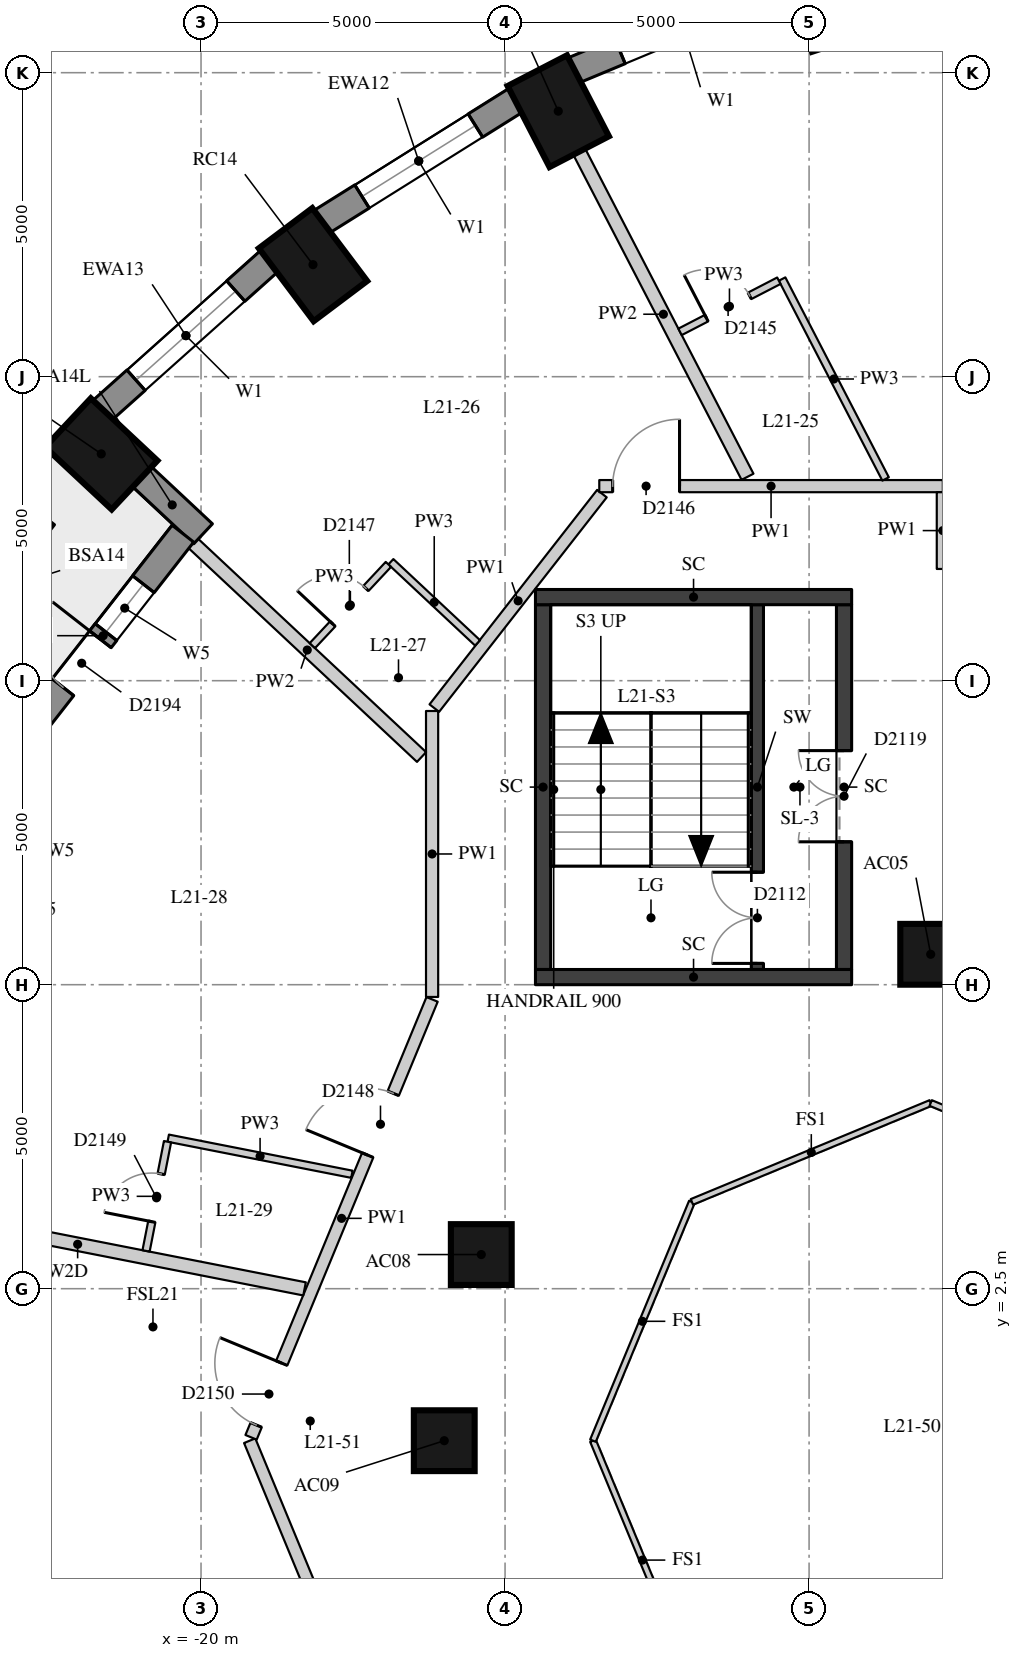
"""IFC4 building model, lengths in metres.
Left out: names, types, materials, properties, quantities, classifications, styles, units other than length and angle.
Written with IfcOpenShell. Run it as: python <this file> out.ifc"""

import sys

from ifc_helpers import new_model, si_unit, direction, frame, frame_2d, origin, origin_2d, place, context, subcontext, project, spatial, rectangle, extrude, element, fill, save


model = new_model("IFC4")
c1 = context("Model", 3, precision=1e-05, world=origin(), true_north=direction((0.0, 1.0)))
c2 = subcontext(c1, "Body", "Model", "MODEL_VIEW")
j1 = project(units=[si_unit("LENGTHUNIT", "METRE"), si_unit("PLANEANGLEUNIT", "RADIAN")], contexts=[c1])
p1 = place(None, origin())
s1 = spatial("IfcSite", under=j1, at=p1, CompositionType="ELEMENT")
p2 = place(p1, origin())
s2 = spatial("IfcBuilding", under=s1, at=p2, CompositionType="ELEMENT")
p3 = place(p2, frame((0.0, 0.0, 77.8)))
s3 = spatial("IfcBuildingStorey", under=s2, at=p3, CompositionType="ELEMENT", Elevation=77.8)
for number, where, z_axis, x_axis in (
    (1, (-14.125, 21.867, 0.0), (0.0, 0.0, 1.0), (-0.46, 0.888, 0.0)),
    (2, (-18.159, 19.343, 0.0), (0.0, 0.0, 1.0), (-0.601, 0.799, 0.0)),
    (3, (-21.641, 16.23, 0.0), (0.0, 0.0, 1.0), (-0.73, 0.683, 0.0)),
):
    element("IfcColumn", number, at=place(p3, frame(where, z_axis=z_axis, x_axis=x_axis)), inside=s3, PredefinedType="COLUMN", context=c2, shape_type="SweptSolid", body=[
        extrude(rectangle(XDim=1.5, YDim=1.1, at=origin_2d()), origin(), (0.0, 0.0, 1.0), 3.3),
    ])
for number, where, z_axis, x_axis in (
    (4, (-8.0, 8.0, 0.0), (0.0, 0.0, 1.0), (1.0, 0.0, 0.0)),
    (5, (-15.391, 3.062, 0.0), (0.0, 0.0, 1.0), (1.0, 0.0, 0.0)),
    (6, (-16.0, 0.0, 0.0), (0.0, 0.0, 1.0), (1.0, 0.0, 0.0)),
):
    element("IfcColumn", number, at=place(p3, frame(where, z_axis=z_axis, x_axis=x_axis)), inside=s3, PredefinedType="COLUMN", context=c2, shape_type="SweptSolid", body=[
        extrude(rectangle(XDim=1.0, YDim=1.0, at=origin_2d()), origin(), (0.0, 0.0, 1.0), 3.3),
    ])
p4 = place(p3, frame((-10.315, 24.021, 0.0), z_axis=(0.0, 0.0, 1.0), x_axis=(-0.923031964282, -0.384723267966, 0.0)))
e7 = element("IfcWall", 7, at=p4, inside=s3, PredefinedType="SOLIDWALL", context=c2, shape_type="SweptSolid", body=[
    extrude(rectangle(XDim=3.856, YDim=0.45, at=frame_2d((1.928, 0.0))), origin(), (0.0, 0.0, 1.0), 3.02),
])
p5 = place(p4, frame((0.828, 0.0, 0.4)))
e8 = element("IfcOpeningElement", 8, at=p5, cuts=e7, PredefinedType="OPENING", context=c2, shape_type="SweptSolid", body=[
    extrude(rectangle(XDim=2.2, YDim=1.75, at=frame_2d((1.1, 0.875))), frame((0.0, 0.235, 0.0), z_axis=(0.0, -1.0, 0.0), x_axis=(1.0, 0.0, 0.0)), (0.0, 0.0, 1.0), 0.47),
])
p6 = place(p3, frame((-14.817, 22.051, 0.0), z_axis=(0.0, 0.0, 1.0), x_axis=(-0.847635480093, -0.530579016629, 0.0)))
e9 = element("IfcWall", 9, at=p6, inside=s3, PredefinedType="SOLIDWALL", context=c2, shape_type="SweptSolid", body=[
    extrude(rectangle(XDim=3.782, YDim=0.45, at=frame_2d((1.891, 0.0))), origin(), (0.0, 0.0, 1.0), 3.02),
])
p7 = place(p6, frame((0.791, 0.0, 0.4)))
e10 = element("IfcOpeningElement", 10, at=p7, cuts=e9, PredefinedType="OPENING", context=c2, shape_type="SweptSolid", body=[
    extrude(rectangle(XDim=2.2, YDim=1.75, at=frame_2d((1.1, 0.875))), frame((0.0, 0.235, 0.0), z_axis=(0.0, -1.0, 0.0), x_axis=(1.0, 0.0, 0.0)), (0.0, 0.0, 1.0), 0.47),
])
p8 = place(p3, frame((-18.871, 19.407, 0.0), z_axis=(0.0, 0.0, 1.0), x_axis=(-0.745526233716, -0.66647628228, 0.0)))
e11 = element("IfcWall", 11, at=p8, inside=s3, PredefinedType="SOLIDWALL", context=c2, shape_type="SweptSolid", body=[
    extrude(rectangle(XDim=3.697, YDim=0.45, at=frame_2d((1.848, 0.0))), origin(), (0.0, 0.0, 1.0), 3.02),
])
p9 = place(p8, frame((0.749, 0.0, 0.4)))
e12 = element("IfcOpeningElement", 12, at=p9, cuts=e11, PredefinedType="OPENING", context=c2, shape_type="SweptSolid", body=[
    extrude(rectangle(XDim=2.2, YDim=1.75, at=frame_2d((1.1, 0.875))), frame((0.0, 0.235, 0.0), z_axis=(0.0, -1.0, 0.0), x_axis=(1.0, 0.0, 0.0)), (0.0, 0.0, 1.0), 0.47),
])
p10 = place(p3, frame((-20.982, 15.866, 0.0), z_axis=(0.0, 0.0, 1.0), x_axis=(0.730062381614, -0.683380508174, 0.0)))
e13 = element("IfcWall", 13, at=p10, inside=s3, PredefinedType="SOLIDWALL", context=c2, shape_type="SweptSolid", body=[
    extrude(rectangle(XDim=1.391, YDim=0.45, at=frame_2d((0.696, 0.0))), origin(), (0.0, 0.0, 1.0), 3.02),
])
p11 = place(p3, frame((-20.298, 14.918, 0.0), z_axis=(0.0, 0.0, 1.0), x_axis=(-0.615578403957, -0.788075649022, 0.0)))
e14 = element("IfcWall", 14, at=p11, inside=s3, PredefinedType="SOLIDWALL", context=c2, shape_type="SweptSolid", body=[
    extrude(rectangle(XDim=4.259, YDim=0.45, at=frame_2d((2.129, 0.0))), origin(), (0.0, 0.0, 1.0), 3.02),
])
p12 = place(p11, frame((1.054, 0.0, 0.4)))
e15 = element("IfcOpeningElement", 15, at=p12, cuts=e14, PredefinedType="OPENING", context=c2, shape_type="SweptSolid", body=[
    extrude(rectangle(XDim=1.0, YDim=1.75, at=frame_2d((0.5, 0.875))), frame((0.0, 0.235, 0.0), z_axis=(0.0, -1.0, 0.0), x_axis=(1.0, 0.0, 0.0)), (0.0, 0.0, 1.0), 0.47),
])
p13 = place(p11, frame((2.204, 0.0, 0.0)))
e16 = element("IfcOpeningElement", 16, at=p13, cuts=e14, PredefinedType="OPENING", context=c2, shape_type="SweptSolid", body=[
    extrude(rectangle(XDim=1.0, YDim=2.15, at=frame_2d((0.5, 1.075))), frame((0.0, 0.235, 0.0), z_axis=(0.0, -1.0, 0.0), x_axis=(1.0, 0.0, 0.0)), (0.0, 0.0, 1.0), 0.47),
])
p14 = place(p3, frame((-22.686, 15.281, 0.0), z_axis=(0.0, 0.0, 1.0), x_axis=(-0.616622746332, -0.787258781282, 0.0)))
e17 = element("IfcWall", 17, at=p14, inside=s3, PredefinedType="USERDEFINED", context=c2, shape_type="SweptSolid", body=[
    extrude(rectangle(XDim=1.8, YDim=0.7, at=frame_2d((0.9, 0.0))), origin(), (0.0, 0.0, 1.0), 0.75),
])
p15 = place(p3, frame((-10.85, 7.75, 0.0), z_axis=(0.0, 0.0, 1.0), x_axis=(0.0, 1.0, 0.0)))
e18 = element("IfcWall", 18, at=p15, inside=s3, PredefinedType="SHEAR", context=c2, shape_type="SweptSolid", body=[
    extrude(rectangle(XDim=6.0, YDim=0.2, at=frame_2d((3.0, 0.0))), origin(), (0.0, 0.0, 1.0), 3.02),
])
p16 = place(p15, frame((0.1, 0.0, 0.0)))
e19 = element("IfcOpeningElement", 19, at=p16, cuts=e18, PredefinedType="OPENING", context=c2, shape_type="SweptSolid", body=[
    extrude(rectangle(XDim=1.5, YDim=2.1, at=frame_2d((0.75, 1.05))), frame((0.0, 0.11, 0.0), z_axis=(0.0, -1.0, 0.0), x_axis=(1.0, 0.0, 0.0)), (0.0, 0.0, 1.0), 0.22),
])
p17 = place(p3, frame((-14.375, 7.75, -0.28), z_axis=(0.0, 0.0, 1.0), x_axis=(0.0, 1.0, 0.0)))
e20 = element("IfcWall", 20, at=p17, inside=s3, PredefinedType="SHEAR", context=c2, shape_type="SweptSolid", body=[
    extrude(rectangle(XDim=6.0, YDim=0.25, at=frame_2d((3.0, 0.0))), origin(), (0.0, 0.0, 1.0), 3.3),
])
p18 = place(p3, frame((-9.425, 7.75, -0.28), z_axis=(0.0, 0.0, 1.0), x_axis=(0.0, 1.0, 0.0)))
e21 = element("IfcWall", 21, at=p18, inside=s3, PredefinedType="SHEAR", context=c2, shape_type="SweptSolid", body=[
    extrude(rectangle(XDim=6.0, YDim=0.25, at=frame_2d((3.0, 0.0))), origin(), (0.0, 0.0, 1.0), 3.3),
])
p19 = place(p18, frame((2.1, 0.0, 0.28)))
e22 = element("IfcOpeningElement", 22, at=p19, cuts=e21, PredefinedType="OPENING", context=c2, shape_type="SweptSolid", body=[
    extrude(rectangle(XDim=1.5, YDim=2.1, at=frame_2d((0.75, 1.05))), frame((0.0, 0.135, 0.0), z_axis=(0.0, -1.0, 0.0), x_axis=(1.0, 0.0, 0.0)), (0.0, 0.0, 1.0), 0.27),
])
for number, where, z_axis, x_axis in (
    (23, (-14.5, 13.875, -0.28), (0.0, 0.0, 1.0), (1.0, 0.0, 0.0)),
    (24, (-14.5, 7.625, -0.28), (0.0, 0.0, 1.0), (1.0, 0.0, 0.0)),
):
    element("IfcWall", number, at=place(p3, frame(where, z_axis=z_axis, x_axis=x_axis)), inside=s3, PredefinedType="SHEAR", context=c2, shape_type="SweptSolid", body=[
        extrude(rectangle(XDim=5.2, YDim=0.25, at=frame_2d((2.6, 0.0))), origin(), (0.0, 0.0, 1.0), 3.3),
    ])
p20 = place(p3, frame((-16.215, -7.221, 0.0), z_axis=(0.0, 0.0, 1.0), x_axis=(-0.382000362846, 0.924162173423, 0.0)))
e25 = element("IfcWall", 25, at=p20, inside=s3, PredefinedType="PARTITIONING", context=c2, shape_type="SweptSolid", body=[
    extrude(rectangle(XDim=7.814, YDim=0.2, at=frame_2d((3.907, 0.0))), origin(), (0.0, 0.0, 1.0), 3.02),
])
p21 = place(p20, frame((0.22, 0.0, 0.0)))
e26 = element("IfcOpeningElement", 26, at=p21, cuts=e25, PredefinedType="OPENING", context=c2, shape_type="SweptSolid", body=[
    extrude(rectangle(XDim=1.1, YDim=2.1, at=frame_2d((0.55, 1.05))), frame((0.0, 0.11, 0.0), z_axis=(0.0, -1.0, 0.0), x_axis=(1.0, 0.0, 0.0)), (0.0, 0.0, 1.0), 0.22),
])
p22 = place(p3, frame((-19.177, 0.056, 0.0), z_axis=(0.0, 0.0, 1.0), x_axis=(0.382011450526, 0.924157590277, 0.0)))
e27 = element("IfcWall", 27, at=p22, inside=s3, PredefinedType="PARTITIONING", context=c2, shape_type="SweptSolid", body=[
    extrude(rectangle(XDim=7.794, YDim=0.2, at=frame_2d((3.897, 0.0))), origin(), (0.0, 0.0, 1.0), 3.02),
])
p23 = place(p22, frame((5.022, 0.0, 0.0)))
e28 = element("IfcOpeningElement", 28, at=p23, cuts=e27, PredefinedType="OPENING", context=c2, shape_type="SweptSolid", body=[
    extrude(rectangle(XDim=1.1, YDim=2.1, at=frame_2d((0.55, 1.05))), frame((0.0, 0.11, 0.0), z_axis=(0.0, -1.0, 0.0), x_axis=(1.0, 0.0, 0.0)), (0.0, 0.0, 1.0), 0.22),
])
p24 = place(p22, frame((0.22, 0.0, 0.0)))
e29 = element("IfcOpeningElement", 29, at=p24, cuts=e27, PredefinedType="OPENING", context=c2, shape_type="SweptSolid", body=[
    extrude(rectangle(XDim=1.1, YDim=2.1, at=frame_2d((0.55, 1.05))), frame((0.0, 0.11, 0.0), z_axis=(0.0, -1.0, 0.0), x_axis=(1.0, 0.0, 0.0)), (0.0, 0.0, 1.0), 0.22),
])
p25 = place(p3, frame((-16.2, 7.298, 0.0), z_axis=(0.0, 0.0, 1.0), x_axis=(0.0, 1.0, 0.0)))
e30 = element("IfcWall", 30, at=p25, inside=s3, PredefinedType="PARTITIONING", context=c2, shape_type="SweptSolid", body=[
    extrude(rectangle(XDim=4.703, YDim=0.2, at=frame_2d((2.352, 0.0))), origin(), (0.0, 0.0, 1.0), 3.02),
])
p26 = place(p3, frame((-16.163, 12.049, 0.0), z_axis=(0.0, 0.0, 1.0), x_axis=(0.6157435057, 0.787946657578, 0.0)))
e31 = element("IfcWall", 31, at=p26, inside=s3, PredefinedType="PARTITIONING", context=c2, shape_type="SweptSolid", body=[
    extrude(rectangle(XDim=4.477, YDim=0.2, at=frame_2d((2.239, 0.0))), origin(), (0.0, 0.0, 1.0), 3.02),
])
p27 = place(p3, frame((-13.45, 15.7, 0.0), z_axis=(0.0, 0.0, 1.0), x_axis=(1.0, 0.0, 0.0)))
e32 = element("IfcWall", 32, at=p27, inside=s3, PredefinedType="PARTITIONING", context=c2, shape_type="SweptSolid", body=[
    extrude(rectangle(XDim=5.65, YDim=0.2, at=frame_2d((2.825, 0.0))), origin(), (0.0, 0.0, 1.0), 3.02),
])
p28 = place(p27, frame((0.22, 0.0, 0.0)))
e33 = element("IfcOpeningElement", 33, at=p28, cuts=e32, PredefinedType="OPENING", context=c2, shape_type="SweptSolid", body=[
    extrude(rectangle(XDim=1.1, YDim=2.1, at=frame_2d((0.55, 1.05))), frame((0.0, 0.11, 0.0), z_axis=(0.0, -1.0, 0.0), x_axis=(1.0, 0.0, 0.0)), (0.0, 0.0, 1.0), 0.22),
])
p29 = place(p3, frame((-7.8, 15.6, 0.0), z_axis=(0.0, 0.0, 1.0), x_axis=(0.0, -1.0, 0.0)))
e34 = element("IfcWall", 34, at=p29, inside=s3, PredefinedType="PARTITIONING", context=c2, shape_type="SweptSolid", body=[
    extrude(rectangle(XDim=1.262, YDim=0.2, at=frame_2d((0.631, 0.0))), origin(), (0.0, 0.0, 1.0), 3.02),
])
p30 = place(p3, frame((-13.78, 21.201, 0.0), z_axis=(0.0, 0.0, 1.0), x_axis=(0.459689820266, -0.888079539875, 0.0)))
e35 = element("IfcWall", 35, at=p30, inside=s3, PredefinedType="PARTITIONING", context=c2, shape_type="SweptSolid", body=[
    extrude(rectangle(XDim=6.021, YDim=0.22, at=frame_2d((3.011, 0.0))), origin(), (0.0, 0.0, 1.0), 3.02),
])
p31 = place(p3, frame((-20.133, 14.764, 0.0), z_axis=(0.0, 0.0, 1.0), x_axis=(0.730092856427, -0.683347950165, 0.0)))
e36 = element("IfcWall", 36, at=p31, inside=s3, PredefinedType="PARTITIONING", context=c2, shape_type="SweptSolid", body=[
    extrude(rectangle(XDim=5.15, YDim=0.22, at=frame_2d((2.575, 0.0))), origin(), (0.0, 0.0, 1.0), 3.02),
])
p32 = place(p3, frame((-25.761, 3.964, 0.0), z_axis=(0.0, 0.0, 1.0), x_axis=(0.981212489184, -0.192930171486, 0.0)))
e37 = element("IfcWall", 37, at=p32, inside=s3, PredefinedType="PARTITIONING", context=c2, shape_type="SweptSolid", body=[
    extrude(rectangle(XDim=7.606, YDim=0.22, at=frame_2d((3.803, 0.0))), origin(), (0.0, 0.0, 1.0), 2.47),
])
p33 = place(p3, frame((-8.742, 15.818, 0.0), z_axis=(0.0, 0.0, 1.0), x_axis=(-0.45967225044, 0.888088634189, 0.0)))
e38 = element("IfcWall", 38, at=p33, inside=s3, PredefinedType="PARTITIONING", context=c2, shape_type="SweptSolid", body=[
    extrude(rectangle(XDim=3.702, YDim=0.12, at=frame_2d((1.851, 0.0))), origin(), (0.0, 0.0, 1.0), 3.02),
])
p34 = place(p3, frame((-15.452, 13.122, 0.0), z_axis=(0.0, 0.0, 1.0), x_axis=(-0.730035995084, 0.683408696083, 0.0)))
e39 = element("IfcWall", 39, at=p34, inside=s3, PredefinedType="PARTITIONING", context=c2, shape_type="SweptSolid", body=[
    extrude(rectangle(XDim=1.953, YDim=0.12, at=frame_2d((0.977, 0.0))), origin(), (0.0, 0.0, 1.0), 3.02),
])
p35 = place(p3, frame((-17.518, 4.382, 0.0), z_axis=(0.0, 0.0, 1.0), x_axis=(-0.981212916867, 0.192927996342, 0.0)))
e40 = element("IfcWall", 40, at=p35, inside=s3, PredefinedType="PARTITIONING", context=c2, shape_type="SweptSolid", body=[
    extrude(rectangle(XDim=3.079, YDim=0.12, at=frame_2d((1.54, 0.0))), origin(), (0.0, 0.0, 1.0), 3.02),
])
p36 = place(p3, frame((-10.497, 19.078, 0.0), z_axis=(0.0, 0.0, 1.0), x_axis=(-0.888095574179, -0.459658842104, 0.0)))
e41 = element("IfcWall", 41, at=p36, inside=s3, PredefinedType="PARTITIONING", context=c2, shape_type="SweptSolid", body=[
    extrude(rectangle(XDim=1.83, YDim=0.12, at=frame_2d((0.915, 0.0))), origin(), (0.0, 0.0, 1.0), 3.02),
])
p37 = place(p36, frame((0.54, 0.0, 0.0)))
e42 = element("IfcOpeningElement", 42, at=p37, cuts=e41, PredefinedType="OPENING", context=c2, shape_type="SweptSolid", body=[
    extrude(rectangle(XDim=0.8, YDim=2.1, at=frame_2d((0.4, 1.05))), frame((0.0, 0.07, 0.0), z_axis=(0.0, -1.0, 0.0), x_axis=(1.0, 0.0, 0.0)), (0.0, 0.0, 1.0), 0.14),
])
p38 = place(p3, frame((-16.919, 14.413, 0.0), z_axis=(0.0, 0.0, 1.0), x_axis=(-0.683306289544, -0.730131847456, 0.0)))
e43 = element("IfcWall", 43, at=p38, inside=s3, PredefinedType="PARTITIONING", context=c2, shape_type="SweptSolid", body=[
    extrude(rectangle(XDim=1.83, YDim=0.12, at=frame_2d((0.915, 0.0))), origin(), (0.0, 0.0, 1.0), 3.02),
])
p39 = place(p38, frame((0.54, 0.0, 0.0)))
e44 = element("IfcOpeningElement", 44, at=p39, cuts=e43, PredefinedType="OPENING", context=c2, shape_type="SweptSolid", body=[
    extrude(rectangle(XDim=0.8, YDim=2.1, at=frame_2d((0.4, 1.05))), frame((0.0, 0.07, 0.0), z_axis=(0.0, -1.0, 0.0), x_axis=(1.0, 0.0, 0.0)), (0.0, 0.0, 1.0), 0.14),
])
p40 = place(p3, frame((-20.551, 4.917, 0.0), z_axis=(0.0, 0.0, 1.0), x_axis=(-0.19288291118, -0.981221780524, 0.0)))
e45 = element("IfcWall", 45, at=p40, inside=s3, PredefinedType="PARTITIONING", context=c2, shape_type="SweptSolid", body=[
    extrude(rectangle(XDim=1.83, YDim=0.12, at=frame_2d((0.915, 0.0))), origin(), (0.0, 0.0, 1.0), 3.02),
])
p41 = place(p40, frame((0.54, 0.0, 0.0)))
e46 = element("IfcOpeningElement", 46, at=p41, cuts=e45, PredefinedType="OPENING", context=c2, shape_type="SweptSolid", body=[
    extrude(rectangle(XDim=0.8, YDim=2.1, at=frame_2d((0.4, 1.05))), frame((0.0, 0.07, 0.0), z_axis=(0.0, -1.0, 0.0), x_axis=(1.0, 0.0, 0.0)), (0.0, 0.0, 1.0), 0.14),
])
for number, where, z_axis, x_axis in (
    (47, (-11.927, -3.927, 0.0), (0.0, 0.0, 1.0), (-0.383, 0.924, 0.0)),
    (48, (-13.554, 0.0, 0.0), (0.0, 0.0, 1.0), (0.383, 0.924, 0.0)),
    (49, (-11.927, 3.927, 0.0), (0.0, 0.0, 1.0), (0.924, 0.383, 0.0)),
    (50, (-8.0, 5.554, 0.0), (0.0, 0.0, 1.0), (0.924, -0.383, 0.0)),
):
    element("IfcWall", number, at=place(p3, frame(where, z_axis=z_axis, x_axis=x_axis)), inside=s3, PredefinedType="PARTITIONING", context=c2, shape_type="SweptSolid", body=[
        extrude(rectangle(XDim=4.251, YDim=0.1, at=frame_2d((2.125, 0.0))), origin(), (0.0, 0.0, 1.0), 3.02),
    ])
p42 = place(p5, origin())
e51 = element("IfcWindow", 51, at=p42, inside=s3, PartitioningType="SINGLE_PANEL", PredefinedType="WINDOW", context=c2, shape_type="SweptSolid", body=[
    extrude(rectangle(XDim=2.2, YDim=1.75, at=frame_2d((1.1, 0.875))), frame((0.0, 0.035, 0.0), z_axis=(0.0, -1.0, 0.0), x_axis=(1.0, 0.0, 0.0)), (0.0, 0.0, 1.0), 0.06),
])
fill(e8, e51)
p43 = place(p7, origin())
e52 = element("IfcWindow", 52, at=p43, inside=s3, PartitioningType="SINGLE_PANEL", PredefinedType="WINDOW", context=c2, shape_type="SweptSolid", body=[
    extrude(rectangle(XDim=2.2, YDim=1.75, at=frame_2d((1.1, 0.875))), frame((0.0, 0.035, 0.0), z_axis=(0.0, -1.0, 0.0), x_axis=(1.0, 0.0, 0.0)), (0.0, 0.0, 1.0), 0.06),
])
fill(e10, e52)
p44 = place(p9, origin())
e53 = element("IfcWindow", 53, at=p44, inside=s3, PartitioningType="SINGLE_PANEL", PredefinedType="WINDOW", context=c2, shape_type="SweptSolid", body=[
    extrude(rectangle(XDim=2.2, YDim=1.75, at=frame_2d((1.1, 0.875))), frame((0.0, 0.035, 0.0), z_axis=(0.0, -1.0, 0.0), x_axis=(1.0, 0.0, 0.0)), (0.0, 0.0, 1.0), 0.06),
])
fill(e12, e53)
p45 = place(p12, origin())
e54 = element("IfcWindow", 54, at=p45, inside=s3, PartitioningType="SINGLE_PANEL", PredefinedType="WINDOW", context=c2, shape_type="SweptSolid", body=[
    extrude(rectangle(XDim=1.0, YDim=1.75, at=frame_2d((0.5, 0.875))), frame((0.0, 0.035, 0.0), z_axis=(0.0, -1.0, 0.0), x_axis=(1.0, 0.0, 0.0)), (0.0, 0.0, 1.0), 0.06),
])
fill(e15, e54)
p46 = place(p13, frame((1.0, 0.0, 0.0), z_axis=(0.0, 0.0, 1.0), x_axis=(-1.0, 0.0, 0.0)))
e55 = element("IfcDoor", 55, at=p46, inside=s3, OperationType="SINGLE_SWING_RIGHT", PredefinedType="DOOR", context=c2, shape_type="SweptSolid", body=[
    extrude(rectangle(XDim=1.0, YDim=2.15, at=frame_2d((0.5, 1.075))), frame((0.0, 0.075, 0.0), z_axis=(0.0, -1.0, 0.0), x_axis=(1.0, 0.0, 0.0)), (0.0, 0.0, 1.0), 0.05),
])
fill(e16, e55)
p47 = place(p16, origin())
e56 = element("IfcDoor", 56, at=p47, inside=s3, OperationType="DOUBLE_DOOR_SINGLE_SWING", PredefinedType="DOOR", context=c2, shape_type="SweptSolid", body=[
    extrude(rectangle(XDim=1.5, YDim=2.1, at=frame_2d((0.75, 1.05))), frame((0.0, 0.025, 0.0), z_axis=(0.0, -1.0, 0.0), x_axis=(1.0, 0.0, 0.0)), (0.0, 0.0, 1.0), 0.05),
])
fill(e19, e56)
p48 = place(p19, origin())
e57 = element("IfcDoor", 57, at=p48, inside=s3, OperationType="DOUBLE_DOOR_SINGLE_SWING", PredefinedType="DOOR", context=c2, shape_type="SweptSolid", body=[
    extrude(rectangle(XDim=1.5, YDim=2.1, at=frame_2d((0.75, 1.05))), frame((0.0, 0.025, 0.0), z_axis=(0.0, -1.0, 0.0), x_axis=(1.0, 0.0, 0.0)), (0.0, 0.0, 1.0), 0.05),
])
fill(e22, e57)
p49 = place(p37, origin())
e58 = element("IfcDoor", 58, at=p49, inside=s3, OperationType="SINGLE_SWING_LEFT", PredefinedType="DOOR", context=c2, shape_type="SweptSolid", body=[
    extrude(rectangle(XDim=0.8, YDim=2.1, at=frame_2d((0.4, 1.05))), frame((0.0, 0.025, 0.0), z_axis=(0.0, -1.0, 0.0), x_axis=(1.0, 0.0, 0.0)), (0.0, 0.0, 1.0), 0.05),
])
fill(e42, e58)
p50 = place(p28, origin())
e59 = element("IfcDoor", 59, at=p50, inside=s3, OperationType="SINGLE_SWING_RIGHT", PredefinedType="DOOR", context=c2, shape_type="SweptSolid", body=[
    extrude(rectangle(XDim=1.1, YDim=2.1, at=frame_2d((0.55, 1.05))), frame((0.0, 0.025, 0.0), z_axis=(0.0, -1.0, 0.0), x_axis=(1.0, 0.0, 0.0)), (0.0, 0.0, 1.0), 0.05),
])
fill(e33, e59)
p51 = place(p39, origin())
e60 = element("IfcDoor", 60, at=p51, inside=s3, OperationType="SINGLE_SWING_LEFT", PredefinedType="DOOR", context=c2, shape_type="SweptSolid", body=[
    extrude(rectangle(XDim=0.8, YDim=2.1, at=frame_2d((0.4, 1.05))), frame((0.0, 0.025, 0.0), z_axis=(0.0, -1.0, 0.0), x_axis=(1.0, 0.0, 0.0)), (0.0, 0.0, 1.0), 0.05),
])
fill(e44, e60)
p52 = place(p23, origin())
e61 = element("IfcDoor", 61, at=p52, inside=s3, OperationType="SINGLE_SWING_LEFT", PredefinedType="DOOR", context=c2, shape_type="SweptSolid", body=[
    extrude(rectangle(XDim=1.1, YDim=2.1, at=frame_2d((0.55, 1.05))), frame((0.0, 0.025, 0.0), z_axis=(0.0, -1.0, 0.0), x_axis=(1.0, 0.0, 0.0)), (0.0, 0.0, 1.0), 0.05),
])
fill(e28, e61)
p53 = place(p41, origin())
e62 = element("IfcDoor", 62, at=p53, inside=s3, OperationType="SINGLE_SWING_LEFT", PredefinedType="DOOR", context=c2, shape_type="SweptSolid", body=[
    extrude(rectangle(XDim=0.8, YDim=2.1, at=frame_2d((0.4, 1.05))), frame((0.0, 0.025, 0.0), z_axis=(0.0, -1.0, 0.0), x_axis=(1.0, 0.0, 0.0)), (0.0, 0.0, 1.0), 0.05),
])
fill(e46, e62)
p54 = place(p24, origin())
e63 = element("IfcDoor", 63, at=p54, inside=s3, OperationType="SINGLE_SWING_RIGHT", PredefinedType="DOOR", context=c2, shape_type="SweptSolid", body=[
    extrude(rectangle(XDim=1.1, YDim=2.1, at=frame_2d((0.55, 1.05))), frame((0.0, 0.025, 0.0), z_axis=(0.0, -1.0, 0.0), x_axis=(1.0, 0.0, 0.0)), (0.0, 0.0, 1.0), 0.05),
])
fill(e29, e63)
save(model, sys.argv[1])
